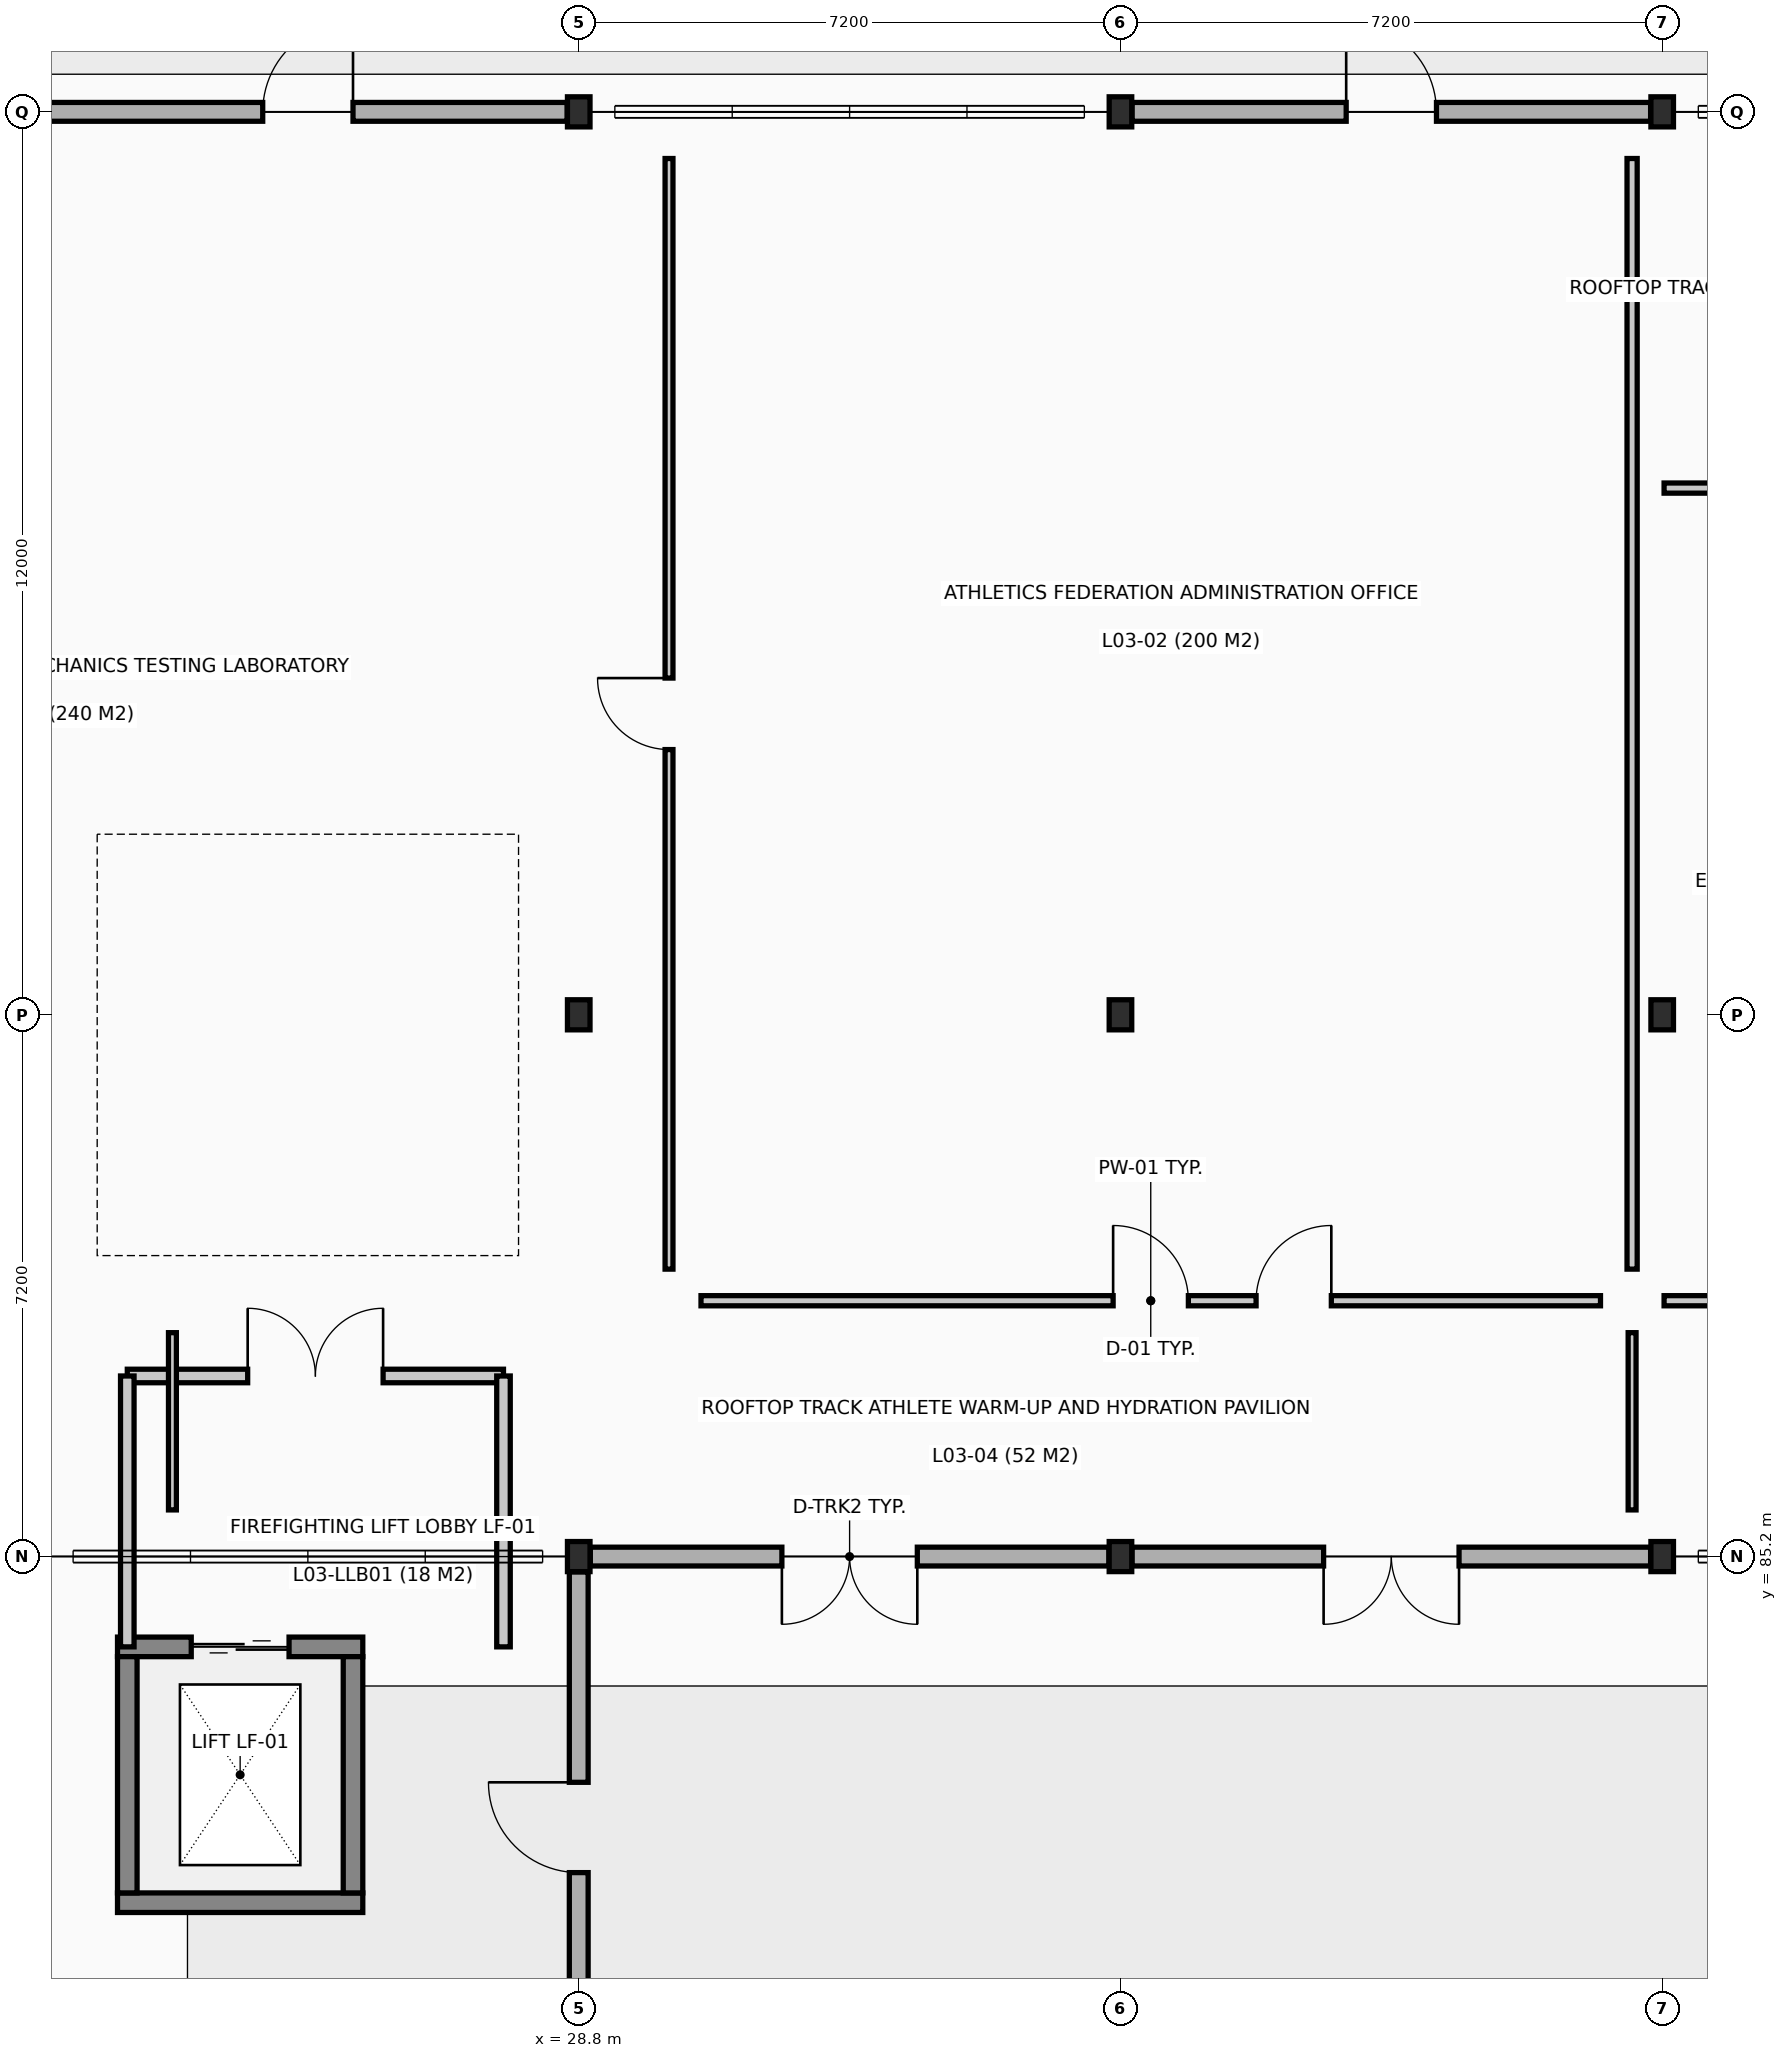
"""IFC4 building model, lengths in metres.
Left out: names, types, materials, properties, quantities, classifications, styles, units other than length and angle.
Written with IfcOpenShell. Run it as: python <this file> out.ifc"""

import sys

from ifc_helpers import new_model, si_unit, direction, frame, frame_2d, origin, origin_2d, place, context, subcontext, project, spatial, rectangle, i_section, extrude, element, fill, save


model = new_model("IFC4")
c1 = context("Model", 3, precision=1e-05, world=origin(), true_north=direction((0.0, 1.0)))
c2 = subcontext(c1, "Body", "Model", "MODEL_VIEW")
j1 = project(units=[si_unit("LENGTHUNIT", "METRE"), si_unit("PLANEANGLEUNIT", "RADIAN")], contexts=[c1])
p1 = place(None, origin())
s1 = spatial("IfcSite", under=j1, at=p1, CompositionType="ELEMENT")
p2 = place(p1, origin())
s2 = spatial("IfcBuilding", under=s1, at=p2, CompositionType="ELEMENT")
p3 = place(p2, frame((0.0, 0.0, 14.4)))
s3 = spatial("IfcBuildingStorey", under=s2, at=p3, CompositionType="ELEMENT", Elevation=14.4)
for number, where, z_axis, x_axis in (
    (1, (28.8, 85.2, 0.0), (0.0, 0.0, 1.0), (1.0, 0.0, 0.0)),
    (2, (28.8, 92.4, 0.0), (0.0, 0.0, 1.0), (1.0, 0.0, 0.0)),
    (3, (28.8, 104.4, 0.0), (0.0, 0.0, 1.0), (1.0, 0.0, 0.0)),
    (4, (36.0, 85.2, 0.0), (0.0, 0.0, 1.0), (1.0, 0.0, 0.0)),
    (5, (36.0, 92.4, 0.0), (0.0, 0.0, 1.0), (1.0, 0.0, 0.0)),
    (6, (36.0, 104.4, 0.0), (0.0, 0.0, 1.0), (1.0, 0.0, 0.0)),
    (7, (43.2, 85.2, 0.0), (0.0, 0.0, 1.0), (1.0, 0.0, 0.0)),
    (8, (43.2, 92.4, 0.0), (0.0, 0.0, 1.0), (1.0, 0.0, 0.0)),
    (9, (43.2, 104.4, 0.0), (0.0, 0.0, 1.0), (1.0, 0.0, 0.0)),
):
    element("IfcColumn", number, at=place(p3, frame(where, z_axis=z_axis, x_axis=x_axis)), inside=s3, PredefinedType="COLUMN", context=c2, shape_type="SweptSolid", body=[
        extrude(i_section(OverallWidth=0.3, OverallDepth=0.4, WebThickness=0.013, FlangeThickness=0.024, at=origin_2d()), origin(), (0.0, 0.0, 1.0), 4.8),
    ])
p4 = place(p3, frame((21.754, 104.4, 0.0), z_axis=(0.0, 0.0, 1.0), x_axis=(1.0, 0.0, 0.0)))
e10 = element("IfcWall", 10, at=p4, inside=s3, PredefinedType="SOLIDWALL", context=c2, shape_type="SweptSolid", body=[
    extrude(rectangle(XDim=6.892, YDim=0.25, at=frame_2d((3.446, 0.0))), origin(), (0.0, 0.0, 1.0), 3.15),
])
p5 = place(p4, frame((2.846, 0.0, 0.0)))
e11 = element("IfcOpeningElement", 11, at=p5, cuts=e10, PredefinedType="OPENING", context=c2, shape_type="SweptSolid", body=[
    extrude(rectangle(XDim=1.2, YDim=2.2, at=frame_2d((0.6, 1.1))), frame((0.0, 0.135, 0.0), z_axis=(0.0, -1.0, 0.0), x_axis=(1.0, 0.0, 0.0)), (0.0, 0.0, 1.0), 0.27),
])
p6 = place(p3, frame((28.954, 85.2, 0.0), z_axis=(0.0, 0.0, 1.0), x_axis=(1.0, 0.0, 0.0)))
e12 = element("IfcWall", 12, at=p6, inside=s3, PredefinedType="SOLIDWALL", context=c2, shape_type="SweptSolid", body=[
    extrude(rectangle(XDim=6.892, YDim=0.25, at=frame_2d((3.446, 0.0))), origin(), (0.0, 0.0, 1.0), 3.15),
])
p7 = place(p6, frame((2.546, 0.0, 0.0)))
e13 = element("IfcOpeningElement", 13, at=p7, cuts=e12, PredefinedType="OPENING", context=c2, shape_type="SweptSolid", body=[
    extrude(rectangle(XDim=1.8, YDim=2.2, at=frame_2d((0.9, 1.1))), frame((0.0, 0.135, 0.0), z_axis=(0.0, -1.0, 0.0), x_axis=(1.0, 0.0, 0.0)), (0.0, 0.0, 1.0), 0.27),
])
p8 = place(p3, frame((36.154, 85.2, 0.0), z_axis=(0.0, 0.0, 1.0), x_axis=(1.0, 0.0, 0.0)))
e14 = element("IfcWall", 14, at=p8, inside=s3, PredefinedType="SOLIDWALL", context=c2, shape_type="SweptSolid", body=[
    extrude(rectangle(XDim=6.892, YDim=0.25, at=frame_2d((3.446, 0.0))), origin(), (0.0, 0.0, 1.0), 3.15),
])
p9 = place(p8, frame((2.546, 0.0, 0.0)))
e15 = element("IfcOpeningElement", 15, at=p9, cuts=e14, PredefinedType="OPENING", context=c2, shape_type="SweptSolid", body=[
    extrude(rectangle(XDim=1.8, YDim=2.2, at=frame_2d((0.9, 1.1))), frame((0.0, 0.135, 0.0), z_axis=(0.0, -1.0, 0.0), x_axis=(1.0, 0.0, 0.0)), (0.0, 0.0, 1.0), 0.27),
])
p10 = place(p3, frame((36.154, 104.4, 0.0), z_axis=(0.0, 0.0, 1.0), x_axis=(1.0, 0.0, 0.0)))
e16 = element("IfcWall", 16, at=p10, inside=s3, PredefinedType="SOLIDWALL", context=c2, shape_type="SweptSolid", body=[
    extrude(rectangle(XDim=6.892, YDim=0.25, at=frame_2d((3.446, 0.0))), origin(), (0.0, 0.0, 1.0), 3.15),
])
p11 = place(p10, frame((2.846, 0.0, 0.0)))
e17 = element("IfcOpeningElement", 17, at=p11, cuts=e16, PredefinedType="OPENING", context=c2, shape_type="SweptSolid", body=[
    extrude(rectangle(XDim=1.2, YDim=2.2, at=frame_2d((0.6, 1.1))), frame((0.0, 0.135, 0.0), z_axis=(0.0, -1.0, 0.0), x_axis=(1.0, 0.0, 0.0)), (0.0, 0.0, 1.0), 0.27),
])
p12 = place(p3, frame((28.8, 78.204, 0.0), z_axis=(0.0, 0.0, 1.0), x_axis=(0.0, 1.0, 0.0)))
e18 = element("IfcWall", 18, at=p12, inside=s3, PredefinedType="SOLIDWALL", context=c2, shape_type="SweptSolid", body=[
    extrude(rectangle(XDim=6.792, YDim=0.25, at=frame_2d((3.396, 0.0))), origin(), (0.0, 0.0, 1.0), 3.15),
])
p13 = place(p12, frame((2.796, 0.0, 0.0)))
e19 = element("IfcOpeningElement", 19, at=p13, cuts=e18, PredefinedType="OPENING", context=c2, shape_type="SweptSolid", body=[
    extrude(rectangle(XDim=1.2, YDim=2.2, at=frame_2d((0.6, 1.1))), frame((0.0, 0.135, 0.0), z_axis=(0.0, -1.0, 0.0), x_axis=(1.0, 0.0, 0.0)), (0.0, 0.0, 1.0), 0.27),
])
p14 = place(p3, frame((22.67, 80.6, 0.0), z_axis=(0.0, 0.0, 1.0), x_axis=(1.0, 0.0, 0.0)))
e20 = element("IfcWall", 20, at=p14, inside=s3, PredefinedType="SHEAR", context=c2, shape_type="SweptSolid", body=[
    extrude(rectangle(XDim=3.26, YDim=0.26, at=frame_2d((1.63, 0.0))), origin(), (0.0, 0.0, 1.0), 4.0),
])
p15 = place(p3, frame((22.67, 84.0, 0.0), z_axis=(0.0, 0.0, 1.0), x_axis=(1.0, 0.0, 0.0)))
e21 = element("IfcWall", 21, at=p15, inside=s3, PredefinedType="SHEAR", context=c2, shape_type="SweptSolid", body=[
    extrude(rectangle(XDim=3.26, YDim=0.26, at=frame_2d((1.63, 0.0))), origin(), (0.0, 0.0, 1.0), 4.0),
])
p16 = place(p15, frame((0.98, 0.0, 0.0)))
e22 = element("IfcOpeningElement", 22, at=p16, cuts=e21, PredefinedType="OPENING", context=c2, shape_type="SweptSolid", body=[
    extrude(rectangle(XDim=1.3, YDim=2.2, at=frame_2d((0.65, 1.1))), frame((0.0, 0.14, 0.0), z_axis=(0.0, -1.0, 0.0), x_axis=(1.0, 0.0, 0.0)), (0.0, 0.0, 1.0), 0.28),
])
for number, where, z_axis, x_axis in (
    (23, (22.8, 80.73, 0.0), (0.0, 0.0, 1.0), (0.0, 1.0, 0.0)),
    (24, (25.8, 80.73, 0.0), (0.0, 0.0, 1.0), (0.0, 1.0, 0.0)),
):
    element("IfcWall", number, at=place(p3, frame(where, z_axis=z_axis, x_axis=x_axis)), inside=s3, PredefinedType="SHEAR", context=c2, shape_type="SweptSolid", body=[
        extrude(rectangle(XDim=3.14, YDim=0.26, at=frame_2d((1.57, 0.0))), origin(), (0.0, 0.0, 1.0), 4.0),
    ])
p17 = place(p3, frame((22.8, 87.6, 0.0), z_axis=(0.0, 0.0, 1.0), x_axis=(1.0, 0.0, 0.0)))
e25 = element("IfcWall", 25, at=p17, inside=s3, PredefinedType="PARTITIONING", context=c2, shape_type="SweptSolid", body=[
    extrude(rectangle(XDim=5.0, YDim=0.18, at=frame_2d((2.5, 0.0))), origin(), (0.0, 0.0, 1.0), 3.985),
])
p18 = place(p17, frame((1.6, 0.0, 0.0)))
e26 = element("IfcOpeningElement", 26, at=p18, cuts=e25, PredefinedType="OPENING", context=c2, shape_type="SweptSolid", body=[
    extrude(rectangle(XDim=1.8, YDim=2.15, at=frame_2d((0.9, 1.075))), frame((0.0, 0.1, 0.0), z_axis=(0.0, -1.0, 0.0), x_axis=(1.0, 0.0, 0.0)), (0.0, 0.0, 1.0), 0.2),
])
for number, where, z_axis, x_axis in (
    (27, (22.8, 84.0, 0.0), (0.0, 0.0, 1.0), (0.0, 1.0, 0.0)),
    (28, (27.8, 84.0, 0.0), (0.0, 0.0, 1.0), (0.0, 1.0, 0.0)),
):
    element("IfcWall", number, at=place(p3, frame(where, z_axis=z_axis, x_axis=x_axis)), inside=s3, PredefinedType="PARTITIONING", context=c2, shape_type="SweptSolid", body=[
        extrude(rectangle(XDim=3.6, YDim=0.18, at=frame_2d((1.8, 0.0))), origin(), (0.0, 0.0, 1.0), 3.985),
    ])
p19 = place(p3, frame((30.0, 89.02, 0.0), z_axis=(0.0, 0.0, 1.0), x_axis=(0.0, 1.0, 0.0)))
e29 = element("IfcWall", 29, at=p19, inside=s3, PredefinedType="PARTITIONING", context=c2, shape_type="SweptSolid", body=[
    extrude(rectangle(XDim=14.76, YDim=0.105, at=frame_2d((7.38, 0.0))), origin(), (0.0, 0.0, 1.0), 3.985),
])
p20 = place(p19, frame((6.905, 0.0, 0.0)))
e30 = element("IfcOpeningElement", 30, at=p20, cuts=e29, PredefinedType="OPENING", context=c2, shape_type="SweptSolid", body=[
    extrude(rectangle(XDim=0.95, YDim=2.1, at=frame_2d((0.475, 1.05))), frame((0.0, 0.062, 0.0), z_axis=(0.0, -1.0, 0.0), x_axis=(1.0, 0.0, 0.0)), (0.0, 0.0, 1.0), 0.125),
])
p21 = place(p3, frame((30.425, 88.6, 0.0), z_axis=(0.0, 0.0, 1.0), x_axis=(1.0, 0.0, 0.0)))
e31 = element("IfcWall", 31, at=p21, inside=s3, PredefinedType="PARTITIONING", context=c2, shape_type="SweptSolid", body=[
    extrude(rectangle(XDim=11.955, YDim=0.135, at=frame_2d((5.978, 0.0))), origin(), (0.0, 0.0, 1.0), 3.985),
])
p22 = place(p21, frame((5.478, 0.0, 0.0)))
e32 = element("IfcOpeningElement", 32, at=p22, cuts=e31, PredefinedType="OPENING", context=c2, shape_type="SweptSolid", body=[
    extrude(rectangle(XDim=1.0, YDim=2.1, at=frame_2d((0.5, 1.05))), frame((0.0, 0.077, 0.0), z_axis=(0.0, -1.0, 0.0), x_axis=(1.0, 0.0, 0.0)), (0.0, 0.0, 1.0), 0.155),
])
p23 = place(p21, frame((7.377, 0.0, 0.0)))
e33 = element("IfcOpeningElement", 33, at=p23, cuts=e31, PredefinedType="OPENING", context=c2, shape_type="SweptSolid", body=[
    extrude(rectangle(XDim=1.0, YDim=2.1, at=frame_2d((0.5, 1.05))), frame((0.0, 0.077, 0.0), z_axis=(0.0, -1.0, 0.0), x_axis=(1.0, 0.0, 0.0)), (0.0, 0.0, 1.0), 0.155),
])
p24 = place(p3, frame((42.8, 89.02, 0.0), z_axis=(0.0, 0.0, 1.0), x_axis=(0.0, 1.0, 0.0)))
e34 = element("IfcWall", 34, at=p24, inside=s3, PredefinedType="PARTITIONING", context=c2, shape_type="SweptSolid", body=[
    extrude(rectangle(XDim=14.76, YDim=0.135, at=frame_2d((7.38, 0.0))), origin(), (0.0, 0.0, 1.0), 3.985),
])
p25 = place(p3, frame((43.225, 88.6, 0.0), z_axis=(0.0, 0.0, 1.0), x_axis=(1.0, 0.0, 0.0)))
e35 = element("IfcWall", 35, at=p25, inside=s3, PredefinedType="PARTITIONING", context=c2, shape_type="SweptSolid", body=[
    extrude(rectangle(XDim=8.555, YDim=0.135, at=frame_2d((4.277, 0.0))), origin(), (0.0, 0.0, 1.0), 3.985),
])
p26 = place(p25, frame((3.802, 0.0, 0.0)))
e36 = element("IfcOpeningElement", 36, at=p26, cuts=e35, PredefinedType="OPENING", context=c2, shape_type="SweptSolid", body=[
    extrude(rectangle(XDim=0.95, YDim=2.1, at=frame_2d((0.475, 1.05))), frame((0.0, 0.077, 0.0), z_axis=(0.0, -1.0, 0.0), x_axis=(1.0, 0.0, 0.0)), (0.0, 0.0, 1.0), 0.155),
])
p27 = place(p3, frame((43.225, 99.4, 0.0), z_axis=(0.0, 0.0, 1.0), x_axis=(1.0, 0.0, 0.0)))
e37 = element("IfcWall", 37, at=p27, inside=s3, PredefinedType="PARTITIONING", context=c2, shape_type="SweptSolid", body=[
    extrude(rectangle(XDim=8.555, YDim=0.135, at=frame_2d((4.277, 0.0))), origin(), (0.0, 0.0, 1.0), 3.985),
])
p28 = place(p27, frame((3.603, 0.0, 0.0)))
e38 = element("IfcOpeningElement", 38, at=p28, cuts=e37, PredefinedType="OPENING", context=c2, shape_type="SweptSolid", body=[
    extrude(rectangle(XDim=1.35, YDim=2.15, at=frame_2d((0.675, 1.075))), frame((0.0, 0.077, 0.0), z_axis=(0.0, -1.0, 0.0), x_axis=(1.0, 0.0, 0.0)), (0.0, 0.0, 1.0), 0.155),
])
p29 = place(p27, frame((6.353, 0.0, 0.0)))
e39 = element("IfcOpeningElement", 39, at=p29, cuts=e37, PredefinedType="OPENING", context=c2, shape_type="SweptSolid", body=[
    extrude(rectangle(XDim=1.05, YDim=2.15, at=frame_2d((0.525, 1.075))), frame((0.0, 0.077, 0.0), z_axis=(0.0, -1.0, 0.0), x_axis=(1.0, 0.0, 0.0)), (0.0, 0.0, 1.0), 0.155),
])
for number, where, z_axis, x_axis in (
    (40, (23.4, 85.82, 0.0), (0.0, 0.0, 1.0), (0.0, 1.0, 0.0)),
    (41, (42.8, 85.82, 0.0), (0.0, 0.0, 1.0), (0.0, 1.0, 0.0)),
):
    element("IfcWall", number, at=place(p3, frame(where, z_axis=z_axis, x_axis=x_axis)), inside=s3, PredefinedType="PARTITIONING", context=c2, shape_type="SweptSolid", body=[
        extrude(rectangle(XDim=2.356, YDim=0.105, at=frame_2d((1.178, 0.0))), origin(), (0.0, 0.0, 1.0), 3.985),
    ])
p30 = place(p5, origin())
e42 = element("IfcDoor", 42, at=p30, inside=s3, OperationType="SINGLE_SWING_RIGHT", PredefinedType="DOOR", context=c2, shape_type="SweptSolid", body=[
    extrude(rectangle(XDim=1.2, YDim=2.2, at=frame_2d((0.6, 1.1))), frame((0.0, 0.025, 0.0), z_axis=(0.0, -1.0, 0.0), x_axis=(1.0, 0.0, 0.0)), (0.0, 0.0, 1.0), 0.05),
])
fill(e11, e42)
p31 = place(p7, frame((1.8, 0.0, 0.0), z_axis=(0.0, 0.0, 1.0), x_axis=(-1.0, 0.0, 0.0)))
e43 = element("IfcDoor", 43, at=p31, inside=s3, OperationType="DOUBLE_DOOR_SINGLE_SWING", PredefinedType="DOOR", context=c2, shape_type="SweptSolid", body=[
    extrude(rectangle(XDim=1.8, YDim=2.2, at=frame_2d((0.9, 1.1))), frame((0.0, 0.025, 0.0), z_axis=(0.0, -1.0, 0.0), x_axis=(1.0, 0.0, 0.0)), (0.0, 0.0, 1.0), 0.05),
])
fill(e13, e43)
p32 = place(p9, frame((1.8, 0.0, 0.0), z_axis=(0.0, 0.0, 1.0), x_axis=(-1.0, 0.0, 0.0)))
e44 = element("IfcDoor", 44, at=p32, inside=s3, OperationType="DOUBLE_DOOR_SINGLE_SWING", PredefinedType="DOOR", context=c2, shape_type="SweptSolid", body=[
    extrude(rectangle(XDim=1.8, YDim=2.2, at=frame_2d((0.9, 1.1))), frame((0.0, 0.025, 0.0), z_axis=(0.0, -1.0, 0.0), x_axis=(1.0, 0.0, 0.0)), (0.0, 0.0, 1.0), 0.05),
])
fill(e15, e44)
p33 = place(p11, origin())
e45 = element("IfcDoor", 45, at=p33, inside=s3, OperationType="SINGLE_SWING_LEFT", PredefinedType="DOOR", context=c2, shape_type="SweptSolid", body=[
    extrude(rectangle(XDim=1.2, YDim=2.2, at=frame_2d((0.6, 1.1))), frame((0.0, 0.025, 0.0), z_axis=(0.0, -1.0, 0.0), x_axis=(1.0, 0.0, 0.0)), (0.0, 0.0, 1.0), 0.05),
])
fill(e17, e45)
p34 = place(p13, frame((1.2, 0.0, 0.0), z_axis=(0.0, 0.0, 1.0), x_axis=(-1.0, 0.0, 0.0)))
e46 = element("IfcDoor", 46, at=p34, inside=s3, OperationType="SINGLE_SWING_LEFT", PredefinedType="DOOR", context=c2, shape_type="SweptSolid", body=[
    extrude(rectangle(XDim=1.2, YDim=2.2, at=frame_2d((0.6, 1.1))), frame((0.0, 0.025, 0.0), z_axis=(0.0, -1.0, 0.0), x_axis=(1.0, 0.0, 0.0)), (0.0, 0.0, 1.0), 0.05),
])
fill(e19, e46)
p35 = place(p16, origin())
e47 = element("IfcDoor", 47, at=p35, inside=s3, OperationType="DOUBLE_DOOR_SLIDING", PredefinedType="DOOR", context=c2, shape_type="SweptSolid", body=[
    extrude(rectangle(XDim=1.3, YDim=2.2, at=frame_2d((0.65, 1.1))), frame((0.0, 0.025, 0.0), z_axis=(0.0, -1.0, 0.0), x_axis=(1.0, 0.0, 0.0)), (0.0, 0.0, 1.0), 0.05),
])
fill(e22, e47)
p36 = place(p18, origin())
e48 = element("IfcDoor", 48, at=p36, inside=s3, OperationType="DOUBLE_DOOR_SINGLE_SWING", PredefinedType="DOOR", context=c2, shape_type="SweptSolid", body=[
    extrude(rectangle(XDim=1.8, YDim=2.15, at=frame_2d((0.9, 1.075))), frame((0.0, 0.025, 0.0), z_axis=(0.0, -1.0, 0.0), x_axis=(1.0, 0.0, 0.0)), (0.0, 0.0, 1.0), 0.05),
])
fill(e26, e48)
p37 = place(p20, origin())
e49 = element("IfcDoor", 49, at=p37, inside=s3, OperationType="SINGLE_SWING_RIGHT", PredefinedType="DOOR", context=c2, shape_type="SweptSolid", body=[
    extrude(rectangle(XDim=0.95, YDim=2.1, at=frame_2d((0.475, 1.05))), frame((0.0, 0.025, 0.0), z_axis=(0.0, -1.0, 0.0), x_axis=(1.0, 0.0, 0.0)), (0.0, 0.0, 1.0), 0.05),
])
fill(e30, e49)
p38 = place(p22, origin())
e50 = element("IfcDoor", 50, at=p38, inside=s3, OperationType="SINGLE_SWING_LEFT", PredefinedType="DOOR", context=c2, shape_type="SweptSolid", body=[
    extrude(rectangle(XDim=1.0, YDim=2.1, at=frame_2d((0.5, 1.05))), frame((0.0, 0.025, 0.0), z_axis=(0.0, -1.0, 0.0), x_axis=(1.0, 0.0, 0.0)), (0.0, 0.0, 1.0), 0.05),
])
fill(e32, e50)
p39 = place(p23, frame((1.0, 0.0, 0.0), z_axis=(0.0, 0.0, 1.0), x_axis=(-1.0, 0.0, 0.0)))
e51 = element("IfcDoor", 51, at=p39, inside=s3, OperationType="SINGLE_SWING_LEFT", PredefinedType="DOOR", context=c2, shape_type="SweptSolid", body=[
    extrude(rectangle(XDim=1.0, YDim=2.1, at=frame_2d((0.5, 1.05))), frame((0.0, 0.025, 0.0), z_axis=(0.0, -1.0, 0.0), x_axis=(1.0, 0.0, 0.0)), (0.0, 0.0, 1.0), 0.05),
])
fill(e33, e51)
save(model, sys.argv[1])
